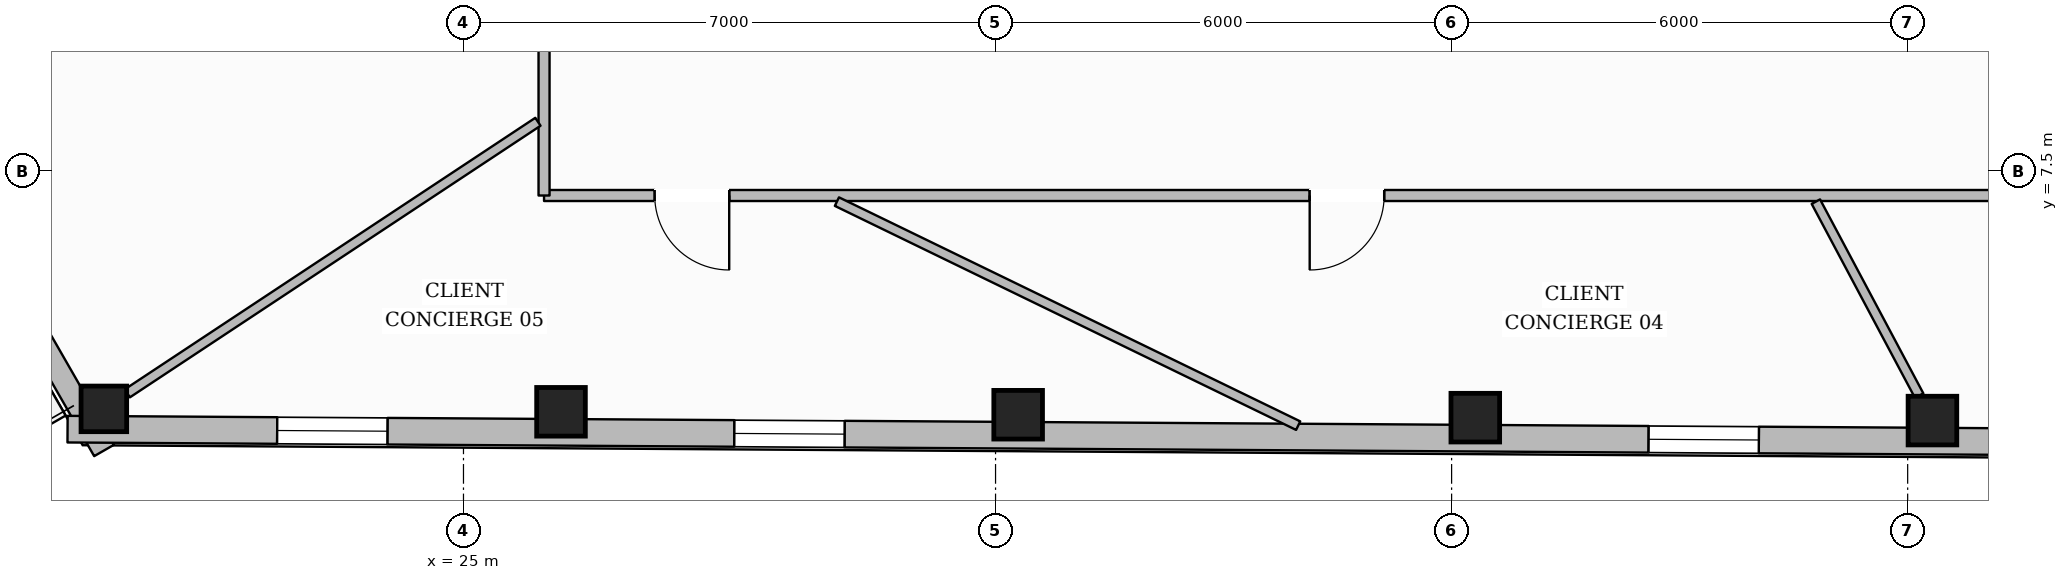
"""IFC4 building model, lengths in metres.
Left out: names, types, materials, properties, quantities, classifications, styles, units other than length and angle.
Written with IfcOpenShell. Run it as: python <this file> out.ifc"""

import sys

from ifc_helpers import new_model, si_unit, direction, frame, frame_2d, origin, origin_2d, place, context, subcontext, project, spatial, rectangle, hollow_rectangle, extrude, element, fill, save


model = new_model("IFC4")
c1 = context("Model", 3, precision=1e-05, world=origin(), true_north=direction((0.0, 1.0)))
c2 = subcontext(c1, "Body", "Model", "MODEL_VIEW")
j1 = project(units=[si_unit("LENGTHUNIT", "METRE"), si_unit("PLANEANGLEUNIT", "RADIAN")], contexts=[c1])
p1 = place(None, origin())
s1 = spatial("IfcSite", under=j1, at=p1, CompositionType="ELEMENT")
p2 = place(p1, origin())
s2 = spatial("IfcBuilding", under=s1, at=p2, CompositionType="ELEMENT")
p3 = place(p2, frame((0.0, 0.0, 172.7)))
s3 = spatial("IfcBuildingStorey", under=s2, at=p3, CompositionType="ELEMENT", Elevation=172.7)
p4 = place(p3, frame((20.269, 4.373, 0.0), z_axis=(0.0, 0.0, 1.0), x_axis=(1.0, 0.0, 0.0)))
e1 = element("IfcColumn", 1, at=p4, inside=s3, PredefinedType="COLUMN", context=c2, shape_type="SweptSolid", body=[
    extrude(hollow_rectangle(XDim=0.6, YDim=0.6, WallThickness=0.028, at=origin_2d()), origin(), (0.0, 0.0, 1.0), 3.6),
])
for number, where, z_axis, x_axis in (
    (2, (26.283, 4.334, 0.0), (0.0, 0.0, 1.0), (1.0, 0.0, 0.0)),
    (3, (32.297, 4.296, 0.0), (0.0, 0.0, 1.0), (1.0, 0.0, 0.0)),
    (4, (38.312, 4.257, 0.0), (0.0, 0.0, 1.0), (1.0, 0.0, 0.0)),
    (5, (44.326, 4.219, 0.0), (0.0, 0.0, 1.0), (1.0, 0.0, 0.0)),
):
    element("IfcColumn", number, at=place(p3, frame(where, z_axis=z_axis, x_axis=x_axis)), inside=s3, PredefinedType="COLUMN", context=c2, shape_type="SweptSolid", body=[
        extrude(hollow_rectangle(XDim=0.64, YDim=0.64, WallThickness=0.028, at=origin_2d()), origin(), (0.0, 0.0, 1.0), 3.6),
    ])
p5 = place(p3, frame((20.271, 3.826, 0.0), z_axis=(0.0, 0.0, 1.0), x_axis=(-0.497981468071, 0.867187671417, 0.0)))
e6 = element("IfcWall", 6, at=p5, inside=s3, PredefinedType="STANDARD", context=c2, shape_type="SweptSolid", body=[
    extrude(rectangle(XDim=10.325, YDim=0.3, at=frame_2d((5.163, 0.0))), origin(), (0.0, 0.0, 1.0), 3.132),
])
p6 = place(p5, frame((4.587, 0.0, 0.0)))
e7 = element("IfcOpeningElement", 7, at=p6, cuts=e6, PredefinedType="OPENING", context=c2, shape_type="SweptSolid", body=[
    extrude(rectangle(XDim=1.15, YDim=2.2, at=frame_2d((0.575, 1.1))), frame((0.0, 0.16, 0.0), z_axis=(0.0, -1.0, 0.0), x_axis=(1.0, 0.0, 0.0)), (0.0, 0.0, 1.0), 0.32),
])
p7 = place(p3, frame((56.835, 3.869, 0.0), z_axis=(0.0, 0.0, 1.0), x_axis=(-0.999979523666, 0.006399394434, 0.0)))
e8 = element("IfcWall", 8, at=p7, inside=s3, PredefinedType="STANDARD", context=c2, shape_type="SweptSolid", body=[
    extrude(rectangle(XDim=37.044, YDim=0.35, at=frame_2d((18.522, 0.0))), origin(), (0.0, 0.0, 1.0), 3.132),
])
p8 = place(p7, frame((32.836, 0.0, 0.65)))
e9 = element("IfcOpeningElement", 9, at=p8, cuts=e8, PredefinedType="OPENING", context=c2, shape_type="SweptSolid", body=[
    extrude(rectangle(XDim=1.45, YDim=1.75, at=frame_2d((0.725, 0.875))), frame((0.0, 0.185, 0.0), z_axis=(0.0, -1.0, 0.0), x_axis=(1.0, 0.0, 0.0)), (0.0, 0.0, 1.0), 0.37),
])
p9 = place(p7, frame((26.822, 0.0, 0.65)))
e10 = element("IfcOpeningElement", 10, at=p9, cuts=e8, PredefinedType="OPENING", context=c2, shape_type="SweptSolid", body=[
    extrude(rectangle(XDim=1.45, YDim=1.75, at=frame_2d((0.725, 0.875))), frame((0.0, 0.185, 0.0), z_axis=(0.0, -1.0, 0.0), x_axis=(1.0, 0.0, 0.0)), (0.0, 0.0, 1.0), 0.37),
])
p10 = place(p7, frame((14.793, 0.0, 0.65)))
e11 = element("IfcOpeningElement", 11, at=p10, cuts=e8, PredefinedType="OPENING", context=c2, shape_type="SweptSolid", body=[
    extrude(rectangle(XDim=1.45, YDim=1.75, at=frame_2d((0.725, 0.875))), frame((0.0, 0.185, 0.0), z_axis=(0.0, -1.0, 0.0), x_axis=(1.0, 0.0, 0.0)), (0.0, 0.0, 1.0), 0.37),
])
p11 = place(p7, frame((8.779, 0.0, 0.65)))
e12 = element("IfcOpeningElement", 12, at=p11, cuts=e8, PredefinedType="OPENING", context=c2, shape_type="SweptSolid", body=[
    extrude(rectangle(XDim=1.45, YDim=1.75, at=frame_2d((0.725, 0.875))), frame((0.0, 0.185, 0.0), z_axis=(0.0, -1.0, 0.0), x_axis=(1.0, 0.0, 0.0)), (0.0, 0.0, 1.0), 0.37),
])
p12 = place(p7, frame((2.764, 0.0, 0.65)))
e13 = element("IfcOpeningElement", 13, at=p12, cuts=e8, PredefinedType="OPENING", context=c2, shape_type="SweptSolid", body=[
    extrude(rectangle(XDim=1.45, YDim=1.75, at=frame_2d((0.725, 0.875))), frame((0.0, 0.185, 0.0), z_axis=(0.0, -1.0, 0.0), x_axis=(1.0, 0.0, 0.0)), (0.0, 0.0, 1.0), 0.37),
])
p13 = place(p3, frame((49.94, 7.18, 0.0), z_axis=(0.0, 0.0, 1.0), x_axis=(-1.0, 0.0, 0.0)))
e14 = element("IfcWall", 14, at=p13, inside=s3, PredefinedType="PARTITIONING", context=c2, shape_type="SweptSolid", body=[
    extrude(rectangle(XDim=23.88, YDim=0.145, at=frame_2d((11.94, 0.0))), origin(), (0.0, 0.0, 1.0), 3.6),
])
p14 = place(p13, frame((12.827, 0.0, 0.0)))
e15 = element("IfcOpeningElement", 15, at=p14, cuts=e14, PredefinedType="OPENING", context=c2, shape_type="SweptSolid", body=[
    extrude(rectangle(XDim=0.98, YDim=2.15, at=frame_2d((0.49, 1.075))), frame((0.0, 0.083, 0.0), z_axis=(0.0, -1.0, 0.0), x_axis=(1.0, 0.0, 0.0)), (0.0, 0.0, 1.0), 0.165),
])
p15 = place(p13, frame((21.444, 0.0, 0.0)))
e16 = element("IfcOpeningElement", 16, at=p15, cuts=e14, PredefinedType="OPENING", context=c2, shape_type="SweptSolid", body=[
    extrude(rectangle(XDim=0.98, YDim=2.15, at=frame_2d((0.49, 1.075))), frame((0.0, 0.083, 0.0), z_axis=(0.0, -1.0, 0.0), x_axis=(1.0, 0.0, 0.0)), (0.0, 0.0, 1.0), 0.165),
])
p16 = place(p3, frame((26.06, 7.18, 0.0), z_axis=(0.0, 0.0, 1.0), x_axis=(0.0, 1.0, 0.0)))
e17 = element("IfcWall", 17, at=p16, inside=s3, PredefinedType="PARTITIONING", context=c2, shape_type="SweptSolid", body=[
    extrude(rectangle(XDim=4.97, YDim=0.145, at=frame_2d((2.485, 0.0))), origin(), (0.0, 0.0, 1.0), 3.6),
])
p17 = place(p3, frame((25.979, 8.15, 0.0), z_axis=(0.0, 0.0, 1.0), x_axis=(-0.834074265075, -0.551652173331, 0.0)))
e18 = element("IfcWall", 18, at=p17, inside=s3, PredefinedType="PARTITIONING", context=c2, shape_type="SweptSolid", body=[
    extrude(rectangle(XDim=6.477, YDim=0.125, at=frame_2d((3.239, 0.0))), origin(), (0.0, 0.0, 1.0), 3.141),
])
p18 = place(p3, frame((42.792, 7.1, 0.0), z_axis=(0.0, 0.0, 1.0), x_axis=(0.469961545261, -0.882686890112, 0.0)))
e19 = element("IfcWall", 19, at=p18, inside=s3, PredefinedType="PARTITIONING", context=c2, shape_type="SweptSolid", body=[
    extrude(rectangle(XDim=2.892, YDim=0.125, at=frame_2d((1.446, 0.0))), origin(), (0.0, 0.0, 1.0), 3.6),
])
p19 = place(p3, frame((29.913, 7.1, 0.0), z_axis=(0.0, 0.0, 1.0), x_axis=(0.899514253978, -0.436891413157, 0.0)))
e20 = element("IfcWall", 20, at=p19, inside=s3, PredefinedType="PARTITIONING", context=c2, shape_type="SweptSolid", body=[
    extrude(rectangle(XDim=6.746, YDim=0.125, at=frame_2d((3.373, 0.0))), origin(), (0.0, 0.0, 1.0), 3.135),
])
p20 = place(p8, origin())
e21 = element("IfcWindow", 21, at=p20, inside=s3, PartitioningType="SINGLE_PANEL", PredefinedType="WINDOW", context=c2, shape_type="SweptSolid", body=[
    extrude(rectangle(XDim=1.45, YDim=1.75, at=frame_2d((0.725, 0.875))), frame((0.0, 0.03, 0.0), z_axis=(0.0, -1.0, 0.0), x_axis=(1.0, 0.0, 0.0)), (0.0, 0.0, 1.0), 0.06),
])
fill(e9, e21)
p21 = place(p9, origin())
e22 = element("IfcWindow", 22, at=p21, inside=s3, PartitioningType="SINGLE_PANEL", PredefinedType="WINDOW", context=c2, shape_type="SweptSolid", body=[
    extrude(rectangle(XDim=1.45, YDim=1.75, at=frame_2d((0.725, 0.875))), frame((0.0, 0.03, 0.0), z_axis=(0.0, -1.0, 0.0), x_axis=(1.0, 0.0, 0.0)), (0.0, 0.0, 1.0), 0.06),
])
fill(e10, e22)
p22 = place(p10, origin())
e23 = element("IfcWindow", 23, at=p22, inside=s3, PartitioningType="SINGLE_PANEL", PredefinedType="WINDOW", context=c2, shape_type="SweptSolid", body=[
    extrude(rectangle(XDim=1.45, YDim=1.75, at=frame_2d((0.725, 0.875))), frame((0.0, 0.03, 0.0), z_axis=(0.0, -1.0, 0.0), x_axis=(1.0, 0.0, 0.0)), (0.0, 0.0, 1.0), 0.06),
])
fill(e11, e23)
p23 = place(p14, origin())
e24 = element("IfcDoor", 24, at=p23, inside=s3, OperationType="SINGLE_SWING_RIGHT", PredefinedType="DOOR", context=c2, shape_type="SweptSolid", body=[
    extrude(rectangle(XDim=0.98, YDim=2.15, at=frame_2d((0.49, 1.075))), frame((0.0, 0.025, 0.0), z_axis=(0.0, -1.0, 0.0), x_axis=(1.0, 0.0, 0.0)), (0.0, 0.0, 1.0), 0.05),
])
fill(e15, e24)
p24 = place(p15, origin())
e25 = element("IfcDoor", 25, at=p24, inside=s3, OperationType="SINGLE_SWING_LEFT", PredefinedType="DOOR", context=c2, shape_type="SweptSolid", body=[
    extrude(rectangle(XDim=0.98, YDim=2.15, at=frame_2d((0.49, 1.075))), frame((0.0, 0.025, 0.0), z_axis=(0.0, -1.0, 0.0), x_axis=(1.0, 0.0, 0.0)), (0.0, 0.0, 1.0), 0.05),
])
fill(e16, e25)
save(model, sys.argv[1])
